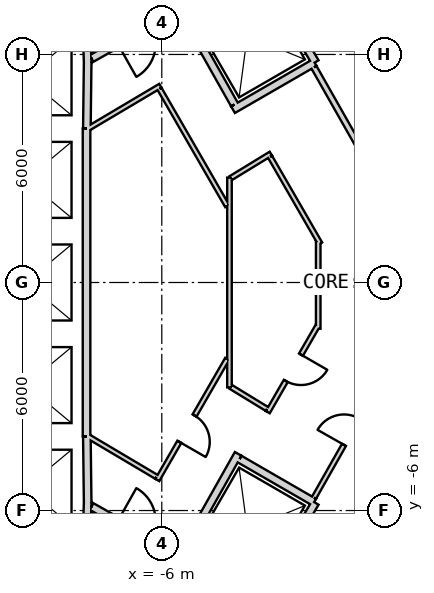
"""IFC4 building model, lengths in metres.
Left out: names, types, materials, properties, quantities, classifications, styles, units other than length and angle.
Written with IfcOpenShell. Run it as: python <this file> out.ifc"""

import sys

from ifc_helpers import new_model, si_unit, direction, frame, frame_2d, origin, place, context, subcontext, project, spatial, rectangle, extrude, element, fill, save


model = new_model("IFC4")
c1 = context("Model", 3, precision=1e-05, world=origin(), true_north=direction((0.0, 1.0)))
c2 = subcontext(c1, "Body", "Model", "MODEL_VIEW")
j1 = project(units=[si_unit("LENGTHUNIT", "METRE"), si_unit("PLANEANGLEUNIT", "RADIAN")], contexts=[c1])
p1 = place(None, origin())
s1 = spatial("IfcSite", under=j1, at=p1, CompositionType="ELEMENT")
p2 = place(p1, origin())
s2 = spatial("IfcBuilding", under=s1, at=p2, CompositionType="ELEMENT")
p3 = place(p2, frame((0.0, 0.0, 333.8)))
s3 = spatial("IfcBuildingStorey", under=s2, at=p3, CompositionType="ELEMENT", Elevation=333.8)
p4 = place(p3, frame((19.475, 2.208, 0.0), z_axis=(0.0, 0.0, 1.0), x_axis=(-0.866028369851, 0.499994862586, 0.0)))
e1 = element("IfcWall", 1, at=p4, inside=s3, PredefinedType="SHEAR", context=c2, shape_type="SweptSolid", body=[
    extrude(rectangle(XDim=31.523, YDim=0.9, at=frame_2d((15.762, 0.0))), origin(), (0.0, 0.0, 1.0), 3.9),
])
p5 = place(p4, frame((7.062, 0.0, 0.0)))
e2 = element("IfcOpeningElement", 2, at=p5, cuts=e1, PredefinedType="OPENING", context=c2, shape_type="SweptSolid", body=[
    extrude(rectangle(XDim=1.2, YDim=2.4, at=frame_2d((0.6, 1.2))), frame((0.0, 0.46, 0.0), z_axis=(0.0, -1.0, 0.0), x_axis=(1.0, 0.0, 0.0)), (0.0, 0.0, 1.0), 0.92),
])
p6 = place(p4, frame((3.612, 0.0, 0.0)))
e3 = element("IfcOpeningElement", 3, at=p6, cuts=e1, PredefinedType="OPENING", context=c2, shape_type="SweptSolid", body=[
    extrude(rectangle(XDim=1.2, YDim=2.4, at=frame_2d((0.6, 1.2))), frame((0.0, 0.46, 0.0), z_axis=(0.0, -1.0, 0.0), x_axis=(1.0, 0.0, 0.0)), (0.0, 0.0, 1.0), 0.92),
])
p7 = place(p4, frame((26.712, 0.0, 0.0)))
e4 = element("IfcOpeningElement", 4, at=p7, cuts=e1, PredefinedType="OPENING", context=c2, shape_type="SweptSolid", body=[
    extrude(rectangle(XDim=1.2, YDim=2.4, at=frame_2d((0.6, 1.2))), frame((0.0, 0.46, 0.0), z_axis=(0.0, -1.0, 0.0), x_axis=(1.0, 0.0, 0.0)), (0.0, 0.0, 1.0), 0.92),
])
p8 = place(p3, frame((-7.825, -17.97, 0.0), z_axis=(0.0, 0.0, 1.0), x_axis=(0.866028369851, 0.499994862586, 0.0)))
e5 = element("IfcWall", 5, at=p8, inside=s3, PredefinedType="SHEAR", context=c2, shape_type="SweptSolid", body=[
    extrude(rectangle(XDim=31.523, YDim=0.9, at=frame_2d((15.762, 0.0))), origin(), (0.0, 0.0, 1.0), 3.9),
])
p9 = place(p8, frame((17.862, 0.0, 0.0)))
e6 = element("IfcOpeningElement", 6, at=p9, cuts=e5, PredefinedType="OPENING", context=c2, shape_type="SweptSolid", body=[
    extrude(rectangle(XDim=1.2, YDim=2.4, at=frame_2d((0.6, 1.2))), frame((0.0, 0.46, 0.0), z_axis=(0.0, -1.0, 0.0), x_axis=(1.0, 0.0, 0.0)), (0.0, 0.0, 1.0), 0.92),
])
p10 = place(p8, frame((20.562, 0.0, 0.0)))
e7 = element("IfcOpeningElement", 7, at=p10, cuts=e5, PredefinedType="OPENING", context=c2, shape_type="SweptSolid", body=[
    extrude(rectangle(XDim=1.2, YDim=2.4, at=frame_2d((0.6, 1.2))), frame((0.0, 0.46, 0.0), z_axis=(0.0, -1.0, 0.0), x_axis=(1.0, 0.0, 0.0)), (0.0, 0.0, 1.0), 0.92),
])
p11 = place(p8, frame((26.712, 0.0, 0.0)))
e8 = element("IfcOpeningElement", 8, at=p11, cuts=e5, PredefinedType="OPENING", context=c2, shape_type="SweptSolid", body=[
    extrude(rectangle(XDim=1.2, YDim=2.4, at=frame_2d((0.6, 1.2))), frame((0.0, 0.46, 0.0), z_axis=(0.0, -1.0, 0.0), x_axis=(1.0, 0.0, 0.0)), (0.0, 0.0, 1.0), 0.92),
])
p12 = place(p8, frame((3.612, 0.0, 0.0)))
e9 = element("IfcOpeningElement", 9, at=p12, cuts=e5, PredefinedType="OPENING", context=c2, shape_type="SweptSolid", body=[
    extrude(rectangle(XDim=1.2, YDim=2.4, at=frame_2d((0.6, 1.2))), frame((0.0, 0.46, 0.0), z_axis=(0.0, -1.0, 0.0), x_axis=(1.0, 0.0, 0.0)), (0.0, 0.0, 1.0), 0.92),
])
p13 = place(p3, frame((-7.977, 6.65, 0.0), z_axis=(0.0, 0.0, 1.0), x_axis=(0.030861509705, -0.999523670164, 0.0)))
e10 = element("IfcWall", 10, at=p13, inside=s3, PredefinedType="PLUMBINGWALL", context=c2, shape_type="SweptSolid", body=[
    extrude(rectangle(XDim=0.878, YDim=0.2, at=frame_2d((0.439, 0.0))), origin(), (0.0, 0.0, 1.0), 3.6),
])
p14 = place(p3, frame((-7.949, 5.895, 0.0), z_axis=(0.0, 0.0, 1.0), x_axis=(-0.012042535896, -0.999927486035, 0.0)))
e11 = element("IfcWall", 11, at=p14, inside=s3, PredefinedType="PLUMBINGWALL", context=c2, shape_type="SweptSolid", body=[
    extrude(rectangle(XDim=1.845, YDim=0.2, at=frame_2d((0.922, 0.0))), origin(), (0.0, 0.0, 1.0), 3.6),
])
p15 = place(p3, frame((-7.98, 4.05, 0.0), z_axis=(0.0, 0.0, 1.0), x_axis=(0.0, -1.0, 0.0)))
e12 = element("IfcWall", 12, at=p15, inside=s3, PredefinedType="PLUMBINGWALL", context=c2, shape_type="SweptSolid", body=[
    extrude(rectangle(XDim=8.1, YDim=0.2, at=frame_2d((4.05, 0.0))), origin(), (0.0, 0.0, 1.0), 3.6),
])
p16 = place(p3, frame((-7.95, -5.772, 0.0), z_axis=(0.0, 0.0, 1.0), x_axis=(-0.030803413295, -0.999525462272, 0.0)))
e13 = element("IfcWall", 13, at=p16, inside=s3, PredefinedType="PLUMBINGWALL", context=c2, shape_type="SweptSolid", body=[
    extrude(rectangle(XDim=1.078, YDim=0.2, at=frame_2d((0.539, 0.0))), origin(), (0.0, 0.0, 1.0), 3.6),
])
p17 = place(p3, frame((-7.971, -4.05, 0.0), z_axis=(0.0, 0.0, 1.0), x_axis=(0.012042535896, -0.999927486035, 0.0)))
e14 = element("IfcWall", 14, at=p17, inside=s3, PredefinedType="PLUMBINGWALL", context=c2, shape_type="SweptSolid", body=[
    extrude(rectangle(XDim=1.845, YDim=0.2, at=frame_2d((0.922, 0.0))), origin(), (0.0, 0.0, 1.0), 3.6),
])
p18 = place(p3, frame((-3.538, 8.465, 0.0), z_axis=(0.0, 0.0, 1.0), x_axis=(0.508647062354, -0.860975125052, 0.0)))
e15 = element("IfcWall", 15, at=p18, inside=s3, PredefinedType="PLUMBINGWALL", context=c2, shape_type="SweptSolid", body=[
    extrude(rectangle(XDim=3.1, YDim=0.2, at=frame_2d((1.55, 0.0))), origin(), (0.0, 0.0, 1.0), 3.6),
])
p19 = place(p3, frame((-1.979, 5.786, 0.0), z_axis=(0.0, 0.0, 1.0), x_axis=(-0.866016689309, -0.500015093611, 0.0)))
e16 = element("IfcWall", 16, at=p19, inside=s3, PredefinedType="PLUMBINGWALL", context=c2, shape_type="SweptSolid", body=[
    extrude(rectangle(XDim=2.479, YDim=0.2, at=frame_2d((1.24, 0.0))), origin(), (0.0, 0.0, 1.0), 3.6),
])
p20 = place(p3, frame((-5.562, 7.296, 0.0), z_axis=(0.0, 0.0, 1.0), x_axis=(0.49134651263, -0.870964180966, 0.0)))
e17 = element("IfcWall", 17, at=p20, inside=s3, PredefinedType="PLUMBINGWALL", context=c2, shape_type="SweptSolid", body=[
    extrude(rectangle(XDim=3.0, YDim=0.2, at=frame_2d((1.5, 0.0))), origin(), (0.0, 0.0, 1.0), 3.6),
])
p21 = place(p3, frame((-1.961, -5.796, 0.0), z_axis=(0.0, 0.0, 1.0), x_axis=(-0.508647062354, -0.860975125052, 0.0)))
e18 = element("IfcWall", 18, at=p21, inside=s3, PredefinedType="PLUMBINGWALL", context=c2, shape_type="SweptSolid", body=[
    extrude(rectangle(XDim=3.1, YDim=0.2, at=frame_2d((1.55, 0.0))), origin(), (0.0, 0.0, 1.0), 3.6),
])
p22 = place(p3, frame((-3.99, -4.509, 0.0), z_axis=(0.0, 0.0, 1.0), x_axis=(-0.491358283181, -0.870957540612, 0.0)))
e19 = element("IfcWall", 19, at=p22, inside=s3, PredefinedType="PLUMBINGWALL", context=c2, shape_type="SweptSolid", body=[
    extrude(rectangle(XDim=3.2, YDim=0.2, at=frame_2d((1.6, 0.0))), origin(), (0.0, 0.0, 1.0), 3.6),
])
p23 = place(p3, frame((-3.953, -4.646, 0.0), z_axis=(0.0, 0.0, 1.0), x_axis=(0.866065302921, -0.4999308863, 0.0)))
e20 = element("IfcWall", 20, at=p23, inside=s3, PredefinedType="PLUMBINGWALL", context=c2, shape_type="SweptSolid", body=[
    extrude(rectangle(XDim=2.264, YDim=0.2, at=frame_2d((1.132, 0.0))), origin(), (0.0, 0.0, 1.0), 3.6),
])
p24 = place(p3, frame((7.497, 4.886, 0.0), z_axis=(0.0, 0.0, 1.0), x_axis=(-0.867541725638, 0.497364407931, 0.0)))
e21 = element("IfcWall", 21, at=p24, inside=s3, PredefinedType="PLUMBINGWALL", context=c2, shape_type="SweptSolid", body=[
    extrude(rectangle(XDim=9.822, YDim=0.15, at=frame_2d((4.911, 0.0))), origin(), (0.0, 0.0, 1.0), 3.6),
])
p25 = place(p24, frame((2.3, 0.0, 0.0)))
e22 = element("IfcOpeningElement", 22, at=p25, cuts=e21, PredefinedType="OPENING", context=c2, shape_type="SweptSolid", body=[
    extrude(rectangle(XDim=0.8, YDim=2.1, at=frame_2d((0.4, 1.05))), frame((0.0, 0.085, 0.0), z_axis=(0.0, -1.0, 0.0), x_axis=(1.0, 0.0, 0.0)), (0.0, 0.0, 1.0), 0.17),
])
p26 = place(p3, frame((-5.6, 7.16, 0.0), z_axis=(0.0, 0.0, 1.0), x_axis=(-0.871363259478, -0.490638431059, 0.0)))
e23 = element("IfcWall", 23, at=p26, inside=s3, PredefinedType="PARTITIONING", context=c2, shape_type="SweptSolid", body=[
    extrude(rectangle(XDim=2.581, YDim=0.2, at=frame_2d((1.291, 0.0))), origin(), (0.0, 0.0, 1.0), 3.6),
])
p27 = place(p26, frame((0.791, 0.0, 0.0)))
e24 = element("IfcOpeningElement", 24, at=p27, cuts=e23, PredefinedType="OPENING", context=c2, shape_type="SweptSolid", body=[
    extrude(rectangle(XDim=1.0, YDim=2.1, at=frame_2d((0.5, 1.05))), frame((0.0, 0.11, 0.0), z_axis=(0.0, -1.0, 0.0), x_axis=(1.0, 0.0, 0.0)), (0.0, 0.0, 1.0), 0.22),
])
p28 = place(p3, frame((-7.849, -5.894, 0.0), z_axis=(0.0, 0.0, 1.0), x_axis=(0.871363259478, -0.490638431059, 0.0)))
e25 = element("IfcWall", 25, at=p28, inside=s3, PredefinedType="PARTITIONING", context=c2, shape_type="SweptSolid", body=[
    extrude(rectangle(XDim=2.581, YDim=0.2, at=frame_2d((1.291, 0.0))), origin(), (0.0, 0.0, 1.0), 3.6),
])
p29 = place(p28, frame((0.791, 0.0, 0.0)))
e26 = element("IfcOpeningElement", 26, at=p29, cuts=e25, PredefinedType="OPENING", context=c2, shape_type="SweptSolid", body=[
    extrude(rectangle(XDim=1.0, YDim=2.1, at=frame_2d((0.5, 1.05))), frame((0.0, 0.11, 0.0), z_axis=(0.0, -1.0, 0.0), x_axis=(1.0, 0.0, 0.0)), (0.0, 0.0, 1.0), 0.22),
])
p30 = place(p3, frame((-1.994, 5.661, 0.0), z_axis=(0.0, 0.0, 1.0), x_axis=(0.493780191404, -0.869586753911, 0.0)))
e27 = element("IfcWall", 27, at=p30, inside=s3, PredefinedType="PLUMBINGWALL", context=c2, shape_type="SweptSolid", body=[
    extrude(rectangle(XDim=3.971, YDim=0.15, at=frame_2d((1.986, 0.0))), origin(), (0.0, 0.0, 1.0), 3.6),
])
p31 = place(p3, frame((0.029, -2.099, 0.0), z_axis=(0.0, 0.0, 1.0), x_axis=(-0.49376265119, -0.869596713592, 0.0)))
e28 = element("IfcWall", 28, at=p31, inside=s3, PredefinedType="PARTITIONING", context=c2, shape_type="SweptSolid", body=[
    extrude(rectangle(XDim=4.097, YDim=0.12, at=frame_2d((2.048, 0.0))), origin(), (0.0, 0.0, 1.0), 3.6),
])
p32 = place(p31, frame((1.7, 0.0, 0.0)))
e29 = element("IfcOpeningElement", 29, at=p32, cuts=e28, PredefinedType="OPENING", context=c2, shape_type="SweptSolid", body=[
    extrude(rectangle(XDim=0.8, YDim=2.1, at=frame_2d((0.4, 1.05))), frame((0.0, 0.07, 0.0), z_axis=(0.0, -1.0, 0.0), x_axis=(1.0, 0.0, 0.0)), (0.0, 0.0, 1.0), 0.14),
])
p33 = place(p3, frame((-4.219, -2.76, 0.0), z_axis=(0.0, 0.0, 1.0), x_axis=(0.0, 1.0, 0.0)))
e30 = element("IfcWall", 30, at=p33, inside=s3, PredefinedType="PARTITIONING", context=c2, shape_type="SweptSolid", body=[
    extrude(rectangle(XDim=5.521, YDim=0.12, at=frame_2d((2.76, 0.0))), origin(), (0.0, 0.0, 1.0), 3.6),
])
p34 = place(p3, frame((-6.118, -5.197, 0.0), z_axis=(0.0, 0.0, 1.0), x_axis=(0.499979045085, 0.866037501772, 0.0)))
e31 = element("IfcWall", 31, at=p34, inside=s3, PredefinedType="PARTITIONING", context=c2, shape_type="SweptSolid", body=[
    extrude(rectangle(XDim=3.679, YDim=0.12, at=frame_2d((1.839, 0.0))), origin(), (0.0, 0.0, 1.0), 3.6),
])
p35 = place(p34, frame((1.16, 0.0, 0.0)))
e32 = element("IfcOpeningElement", 32, at=p35, cuts=e31, PredefinedType="OPENING", context=c2, shape_type="SweptSolid", body=[
    extrude(rectangle(XDim=0.8, YDim=2.1, at=frame_2d((0.4, 1.05))), frame((0.0, 0.07, 0.0), z_axis=(0.0, -1.0, 0.0), x_axis=(1.0, 0.0, 0.0)), (0.0, 0.0, 1.0), 0.14),
])
p36 = place(p3, frame((-7.95, -4.041, 0.0), z_axis=(0.0, 0.0, 1.0), x_axis=(0.860112457103, -0.510104461004, 0.0)))
e33 = element("IfcWall", 33, at=p36, inside=s3, PredefinedType="PARTITIONING", context=c2, shape_type="SweptSolid", body=[
    extrude(rectangle(XDim=2.104, YDim=0.12, at=frame_2d((1.052, 0.0))), origin(), (0.0, 0.0, 1.0), 3.6),
])
p37 = place(p3, frame((-6.037, 5.176, 0.0), z_axis=(0.0, 0.0, 1.0), x_axis=(-0.860106072674, -0.510115225953, 0.0)))
e34 = element("IfcWall", 34, at=p37, inside=s3, PredefinedType="PARTITIONING", context=c2, shape_type="SweptSolid", body=[
    extrude(rectangle(XDim=2.225, YDim=0.12, at=frame_2d((1.112, 0.0))), origin(), (0.0, 0.0, 1.0), 3.6),
])
p38 = place(p3, frame((-4.279, 2.011, 0.0), z_axis=(0.0, 0.0, 1.0), x_axis=(-0.500027278734, 0.866009653827, 0.0)))
e35 = element("IfcWall", 35, at=p38, inside=s3, PredefinedType="PARTITIONING", context=c2, shape_type="SweptSolid", body=[
    extrude(rectangle(XDim=3.559, YDim=0.12, at=frame_2d((1.779, 0.0))), origin(), (0.0, 0.0, 1.0), 3.6),
])
p39 = place(p3, frame((-3.13, 3.391, 0.0), z_axis=(0.0, 0.0, 1.0), x_axis=(-0.853228335638, -0.521537541567, 0.0)))
e36 = element("IfcWall", 36, at=p39, inside=s3, PredefinedType="PARTITIONING", context=c2, shape_type="SweptSolid", body=[
    extrude(rectangle(XDim=1.241, YDim=0.12, at=frame_2d((0.621, 0.0))), origin(), (0.0, 0.0, 1.0), 3.6),
])
p40 = place(p3, frame((-1.832, 1.022, 0.0), z_axis=(0.0, 0.0, 1.0), x_axis=(-0.500000102728, 0.866025344474, 0.0)))
e37 = element("IfcWall", 37, at=p40, inside=s3, PredefinedType="PARTITIONING", context=c2, shape_type="SweptSolid", body=[
    extrude(rectangle(XDim=2.639, YDim=0.12, at=frame_2d((1.319, 0.0))), origin(), (0.0, 0.0, 1.0), 3.6),
])
p41 = place(p3, frame((-1.884, -1.216, 0.0), z_axis=(0.0, 0.0, 1.0), x_axis=(0.0, 1.0, 0.0)))
e38 = element("IfcWall", 38, at=p41, inside=s3, PredefinedType="PARTITIONING", context=c2, shape_type="SweptSolid", body=[
    extrude(rectangle(XDim=2.31, YDim=0.12, at=frame_2d((1.155, 0.0))), origin(), (0.0, 0.0, 1.0), 3.6),
])
p42 = place(p3, frame((-3.211, -3.412, 0.0), z_axis=(0.0, 0.0, 1.0), x_axis=(0.500013727357, 0.866017478146, 0.0)))
e39 = element("IfcWall", 39, at=p42, inside=s3, PredefinedType="PARTITIONING", context=c2, shape_type="SweptSolid", body=[
    extrude(rectangle(XDim=2.636, YDim=0.12, at=frame_2d((1.318, 0.0))), origin(), (0.0, 0.0, 1.0), 3.6),
])
p43 = place(p42, frame((0.948, 0.0, 0.0)))
e40 = element("IfcOpeningElement", 40, at=p43, cuts=e39, PredefinedType="OPENING", context=c2, shape_type="SweptSolid", body=[
    extrude(rectangle(XDim=0.8, YDim=2.1, at=frame_2d((0.4, 1.05))), frame((0.0, 0.07, 0.0), z_axis=(0.0, -1.0, 0.0), x_axis=(1.0, 0.0, 0.0)), (0.0, 0.0, 1.0), 0.14),
])
p44 = place(p3, frame((-4.189, -2.744, 0.0), z_axis=(0.0, 0.0, 1.0), x_axis=(0.853217230587, -0.521555708845, 0.0)))
e41 = element("IfcWall", 41, at=p44, inside=s3, PredefinedType="PARTITIONING", context=c2, shape_type="SweptSolid", body=[
    extrude(rectangle(XDim=1.121, YDim=0.12, at=frame_2d((0.561, 0.0))), origin(), (0.0, 0.0, 1.0), 3.6),
])
p45 = place(p3, frame((-6.505, -21.885, 0.0), z_axis=(0.0, 0.0, 1.0), x_axis=(0.86602457258, 0.500001439686, 0.0)))
e42 = element("IfcWall", 42, at=p45, inside=s3, PredefinedType="PARTITIONING", context=c2, shape_type="SweptSolid", body=[
    extrude(rectangle(XDim=32.952, YDim=0.2, at=frame_2d((16.476, 0.0))), origin(), (0.0, 0.0, 1.0), 2.97),
])
p46 = place(p45, frame((28.061, 0.0, 0.0)))
e43 = element("IfcOpeningElement", 43, at=p46, cuts=e42, PredefinedType="OPENING", context=c2, shape_type="SweptSolid", body=[
    extrude(rectangle(XDim=1.0, YDim=2.1, at=frame_2d((0.5, 1.05))), frame((0.0, 0.11, 0.0), z_axis=(0.0, -1.0, 0.0), x_axis=(1.0, 0.0, 0.0)), (0.0, 0.0, 1.0), 0.22),
])
p47 = place(p45, frame((16.137, 0.0, 0.0)))
e44 = element("IfcOpeningElement", 44, at=p47, cuts=e42, PredefinedType="OPENING", context=c2, shape_type="SweptSolid", body=[
    extrude(rectangle(XDim=1.0, YDim=2.1, at=frame_2d((0.5, 1.05))), frame((0.0, 0.11, 0.0), z_axis=(0.0, -1.0, 0.0), x_axis=(1.0, 0.0, 0.0)), (0.0, 0.0, 1.0), 0.22),
])
p48 = place(p45, frame((4.101, 0.0, 0.0)))
e45 = element("IfcOpeningElement", 45, at=p48, cuts=e42, PredefinedType="OPENING", context=c2, shape_type="SweptSolid", body=[
    extrude(rectangle(XDim=1.0, YDim=2.1, at=frame_2d((0.5, 1.05))), frame((0.0, 0.11, 0.0), z_axis=(0.0, -1.0, 0.0), x_axis=(1.0, 0.0, 0.0)), (0.0, 0.0, 1.0), 0.22),
])
p49 = place(p32, origin())
e46 = element("IfcDoor", 46, at=p49, inside=s3, OperationType="SINGLE_SWING_LEFT", PredefinedType="USERDEFINED", context=c2, shape_type="SweptSolid", body=[
    extrude(rectangle(XDim=0.8, YDim=2.1, at=frame_2d((0.4, 1.05))), frame((0.0, 0.025, 0.0), z_axis=(0.0, -1.0, 0.0), x_axis=(1.0, 0.0, 0.0)), (0.0, 0.0, 1.0), 0.05),
])
fill(e29, e46)
p50 = place(p35, origin())
e47 = element("IfcDoor", 47, at=p50, inside=s3, OperationType="SINGLE_SWING_RIGHT", PredefinedType="USERDEFINED", context=c2, shape_type="SweptSolid", body=[
    extrude(rectangle(XDim=0.8, YDim=2.1, at=frame_2d((0.4, 1.05))), frame((0.0, 0.025, 0.0), z_axis=(0.0, -1.0, 0.0), x_axis=(1.0, 0.0, 0.0)), (0.0, 0.0, 1.0), 0.05),
])
fill(e32, e47)
p51 = place(p43, origin())
e48 = element("IfcDoor", 48, at=p51, inside=s3, OperationType="SINGLE_SWING_RIGHT", PredefinedType="USERDEFINED", context=c2, shape_type="SweptSolid", body=[
    extrude(rectangle(XDim=0.8, YDim=2.1, at=frame_2d((0.4, 1.05))), frame((0.0, 0.025, 0.0), z_axis=(0.0, -1.0, 0.0), x_axis=(1.0, 0.0, 0.0)), (0.0, 0.0, 1.0), 0.05),
])
fill(e40, e48)
save(model, sys.argv[1])
